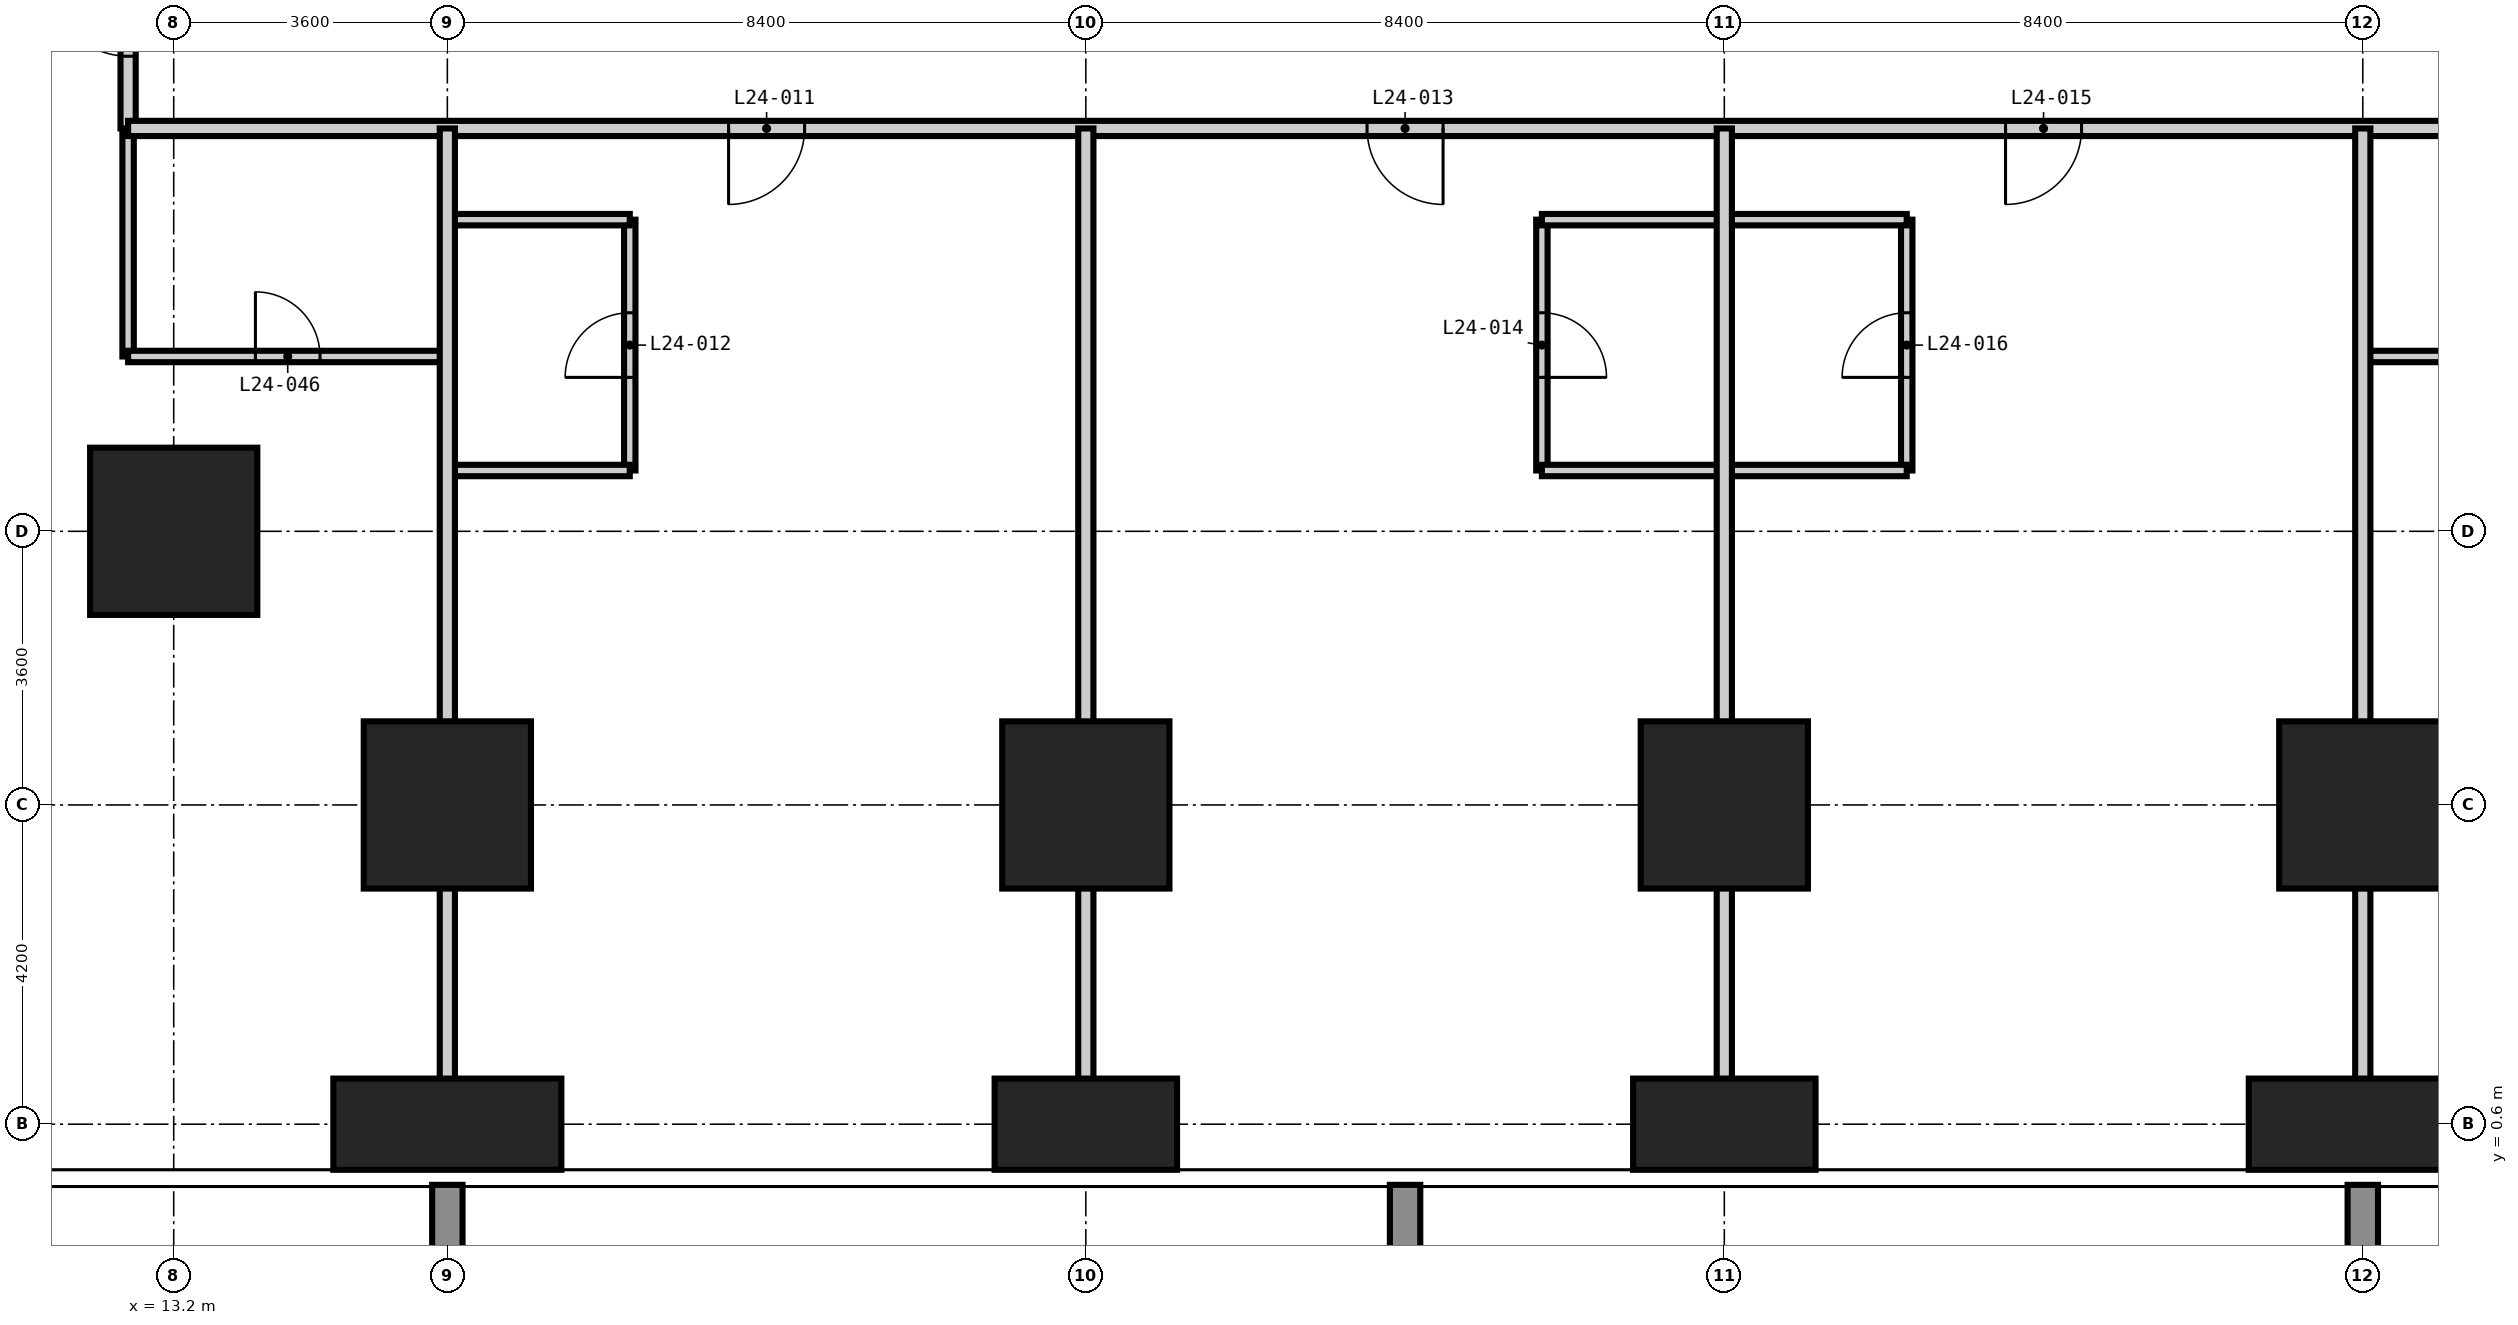
"""IFC4 building model, lengths in metres.
Left out: names, types, materials, properties, quantities, classifications, styles, units other than length and angle.
Written with IfcOpenShell. Run it as: python <this file> out.ifc"""

import sys

from ifc_helpers import new_model, si_unit, direction, frame, frame_2d, origin, origin_2d, place, context, subcontext, project, spatial, rectangle, extrude, element, fill, save


model = new_model("IFC4")
c1 = context("Model", 3, precision=1e-05, world=origin(), true_north=direction((0.0, 1.0)))
c2 = subcontext(c1, "Body", "Model", "MODEL_VIEW")
j1 = project(units=[si_unit("LENGTHUNIT", "METRE"), si_unit("PLANEANGLEUNIT", "RADIAN")], contexts=[c1])
p1 = place(None, origin())
s1 = spatial("IfcSite", under=j1, at=p1, CompositionType="ELEMENT")
p2 = place(p1, origin())
s2 = spatial("IfcBuilding", under=s1, at=p2, CompositionType="ELEMENT")
p3 = place(p2, frame((0.0, 0.0, 97.2)))
s3 = spatial("IfcBuildingStorey", under=s2, at=p3, CompositionType="ELEMENT", Elevation=97.2)
p4 = place(p3, frame((13.2, 8.4, -0.35), z_axis=(0.0, 0.0, 1.0), x_axis=(1.0, 0.0, 0.0)))
e1 = element("IfcColumn", 1, at=p4, inside=s3, PredefinedType="COLUMN", context=c2, shape_type="SweptSolid", body=[
    extrude(rectangle(XDim=2.2, YDim=2.2, at=origin_2d()), origin(), (0.0, 0.0, 1.0), 3.6),
])
p5 = place(p3, frame((16.8, 0.6, -0.35), z_axis=(0.0, 0.0, 1.0), x_axis=(1.0, 0.0, 0.0)))
e2 = element("IfcColumn", 2, at=p5, inside=s3, PredefinedType="COLUMN", context=c2, shape_type="SweptSolid", body=[
    extrude(rectangle(XDim=3.0, YDim=1.2, at=origin_2d()), origin(), (0.0, 0.0, 1.0), 3.6),
])
p6 = place(p3, frame((16.8, 4.8, -0.35), z_axis=(0.0, 0.0, 1.0), x_axis=(1.0, 0.0, 0.0)))
e3 = element("IfcColumn", 3, at=p6, inside=s3, PredefinedType="COLUMN", context=c2, shape_type="SweptSolid", body=[
    extrude(rectangle(XDim=2.2, YDim=2.2, at=origin_2d()), origin(), (0.0, 0.0, 1.0), 3.6),
])
p7 = place(p3, frame((25.2, 0.6, -0.35), z_axis=(0.0, 0.0, 1.0), x_axis=(1.0, 0.0, 0.0)))
e4 = element("IfcColumn", 4, at=p7, inside=s3, PredefinedType="COLUMN", context=c2, shape_type="SweptSolid", body=[
    extrude(rectangle(XDim=2.4, YDim=1.2, at=origin_2d()), origin(), (0.0, 0.0, 1.0), 3.6),
])
p8 = place(p3, frame((25.2, 4.8, -0.35), z_axis=(0.0, 0.0, 1.0), x_axis=(1.0, 0.0, 0.0)))
e5 = element("IfcColumn", 5, at=p8, inside=s3, PredefinedType="COLUMN", context=c2, shape_type="SweptSolid", body=[
    extrude(rectangle(XDim=2.2, YDim=2.2, at=origin_2d()), origin(), (0.0, 0.0, 1.0), 3.6),
])
p9 = place(p3, frame((33.6, 0.6, -0.35), z_axis=(0.0, 0.0, 1.0), x_axis=(1.0, 0.0, 0.0)))
e6 = element("IfcColumn", 6, at=p9, inside=s3, PredefinedType="COLUMN", context=c2, shape_type="SweptSolid", body=[
    extrude(rectangle(XDim=2.4, YDim=1.2, at=origin_2d()), origin(), (0.0, 0.0, 1.0), 3.6),
])
p10 = place(p3, frame((33.6, 4.8, -0.35), z_axis=(0.0, 0.0, 1.0), x_axis=(1.0, 0.0, 0.0)))
e7 = element("IfcColumn", 7, at=p10, inside=s3, PredefinedType="COLUMN", context=c2, shape_type="SweptSolid", body=[
    extrude(rectangle(XDim=2.2, YDim=2.2, at=origin_2d()), origin(), (0.0, 0.0, 1.0), 3.6),
])
p11 = place(p3, frame((42.0, 0.6, -0.35), z_axis=(0.0, 0.0, 1.0), x_axis=(1.0, 0.0, 0.0)))
e8 = element("IfcColumn", 8, at=p11, inside=s3, PredefinedType="COLUMN", context=c2, shape_type="SweptSolid", body=[
    extrude(rectangle(XDim=3.0, YDim=1.2, at=origin_2d()), origin(), (0.0, 0.0, 1.0), 3.6),
])
p12 = place(p3, frame((42.0, 4.8, -0.35), z_axis=(0.0, 0.0, 1.0), x_axis=(1.0, 0.0, 0.0)))
e9 = element("IfcColumn", 9, at=p12, inside=s3, PredefinedType="COLUMN", context=c2, shape_type="SweptSolid", body=[
    extrude(rectangle(XDim=2.2, YDim=2.2, at=origin_2d()), origin(), (0.0, 0.0, 1.0), 3.6),
])
p13 = place(p3, frame((12.6, 10.7, 0.0), z_axis=(0.0, 0.0, 1.0), x_axis=(0.0, 1.0, 0.0)))
e10 = element("IfcWall", 10, at=p13, inside=s3, PredefinedType="PARTITIONING", context=c2, shape_type="SweptSolid", body=[
    extrude(rectangle(XDim=3.0, YDim=0.15, at=frame_2d((1.5, 0.0))), origin(), (0.0, 0.0, 1.0), 3.25),
])
p14 = place(p3, frame((19.2, 9.2, 0.0), z_axis=(0.0, 0.0, 1.0), x_axis=(0.0, 1.0, 0.0)))
e11 = element("IfcWall", 11, at=p14, inside=s3, PredefinedType="PARTITIONING", context=c2, shape_type="SweptSolid", body=[
    extrude(rectangle(XDim=3.3, YDim=0.15, at=frame_2d((1.65, 0.0))), origin(), (0.0, 0.0, 1.0), 3.25),
])
p15 = place(p14, frame((1.225, 0.0, 0.0)))
e12 = element("IfcOpeningElement", 12, at=p15, cuts=e11, PredefinedType="OPENING", context=c2, shape_type="SweptSolid", body=[
    extrude(rectangle(XDim=0.85, YDim=2.1, at=frame_2d((0.425, 1.05))), frame((0.0, 0.085, 0.0), z_axis=(0.0, -1.0, 0.0), x_axis=(1.0, 0.0, 0.0)), (0.0, 0.0, 1.0), 0.17),
])
p16 = place(p3, frame((31.2, 9.2, 0.0), z_axis=(0.0, 0.0, 1.0), x_axis=(0.0, 1.0, 0.0)))
e13 = element("IfcWall", 13, at=p16, inside=s3, PredefinedType="PARTITIONING", context=c2, shape_type="SweptSolid", body=[
    extrude(rectangle(XDim=3.3, YDim=0.15, at=frame_2d((1.65, 0.0))), origin(), (0.0, 0.0, 1.0), 3.25),
])
p17 = place(p16, frame((1.225, 0.0, 0.0)))
e14 = element("IfcOpeningElement", 14, at=p17, cuts=e13, PredefinedType="OPENING", context=c2, shape_type="SweptSolid", body=[
    extrude(rectangle(XDim=0.85, YDim=2.1, at=frame_2d((0.425, 1.05))), frame((0.0, 0.085, 0.0), z_axis=(0.0, -1.0, 0.0), x_axis=(1.0, 0.0, 0.0)), (0.0, 0.0, 1.0), 0.17),
])
p18 = place(p3, frame((36.0, 9.2, 0.0), z_axis=(0.0, 0.0, 1.0), x_axis=(0.0, 1.0, 0.0)))
e15 = element("IfcWall", 15, at=p18, inside=s3, PredefinedType="PARTITIONING", context=c2, shape_type="SweptSolid", body=[
    extrude(rectangle(XDim=3.3, YDim=0.15, at=frame_2d((1.65, 0.0))), origin(), (0.0, 0.0, 1.0), 3.25),
])
p19 = place(p18, frame((1.225, 0.0, 0.0)))
e16 = element("IfcOpeningElement", 16, at=p19, cuts=e15, PredefinedType="OPENING", context=c2, shape_type="SweptSolid", body=[
    extrude(rectangle(XDim=0.85, YDim=2.1, at=frame_2d((0.425, 1.05))), frame((0.0, 0.085, 0.0), z_axis=(0.0, -1.0, 0.0), x_axis=(1.0, 0.0, 0.0)), (0.0, 0.0, 1.0), 0.17),
])
p20 = place(p3, frame((16.8, 9.2, 0.0), z_axis=(0.0, 0.0, 1.0), x_axis=(1.0, 0.0, 0.0)))
e17 = element("IfcWall", 17, at=p20, inside=s3, PredefinedType="PARTITIONING", context=c2, shape_type="SweptSolid", body=[
    extrude(rectangle(XDim=2.4, YDim=0.15, at=frame_2d((1.2, 0.0))), origin(), (0.0, 0.0, 1.0), 3.25),
])
p21 = place(p3, frame((31.2, 9.2, 0.0), z_axis=(0.0, 0.0, 1.0), x_axis=(1.0, 0.0, 0.0)))
e18 = element("IfcWall", 18, at=p21, inside=s3, PredefinedType="PARTITIONING", context=c2, shape_type="SweptSolid", body=[
    extrude(rectangle(XDim=4.8, YDim=0.15, at=frame_2d((2.4, 0.0))), origin(), (0.0, 0.0, 1.0), 3.25),
])
p22 = place(p3, frame((12.6, 10.7, 0.0), z_axis=(0.0, 0.0, 1.0), x_axis=(1.0, 0.0, 0.0)))
e19 = element("IfcWall", 19, at=p22, inside=s3, PredefinedType="PARTITIONING", context=c2, shape_type="SweptSolid", body=[
    extrude(rectangle(XDim=4.2, YDim=0.15, at=frame_2d((2.1, 0.0))), origin(), (0.0, 0.0, 1.0), 3.25),
])
p23 = place(p22, frame((1.675, 0.0, 0.0)))
e20 = element("IfcOpeningElement", 20, at=p23, cuts=e19, PredefinedType="OPENING", context=c2, shape_type="SweptSolid", body=[
    extrude(rectangle(XDim=0.85, YDim=2.1, at=frame_2d((0.425, 1.05))), frame((0.0, 0.085, 0.0), z_axis=(0.0, -1.0, 0.0), x_axis=(1.0, 0.0, 0.0)), (0.0, 0.0, 1.0), 0.17),
])
p24 = place(p3, frame((42.0, 10.7, 0.0), z_axis=(0.0, 0.0, 1.0), x_axis=(1.0, 0.0, 0.0)))
e21 = element("IfcWall", 21, at=p24, inside=s3, PredefinedType="PARTITIONING", context=c2, shape_type="SweptSolid", body=[
    extrude(rectangle(XDim=2.5, YDim=0.15, at=frame_2d((1.25, 0.0))), origin(), (0.0, 0.0, 1.0), 3.25),
])
p25 = place(p3, frame((16.8, 12.5, 0.0), z_axis=(0.0, 0.0, 1.0), x_axis=(1.0, 0.0, 0.0)))
e22 = element("IfcWall", 22, at=p25, inside=s3, PredefinedType="PARTITIONING", context=c2, shape_type="SweptSolid", body=[
    extrude(rectangle(XDim=2.4, YDim=0.15, at=frame_2d((1.2, 0.0))), origin(), (0.0, 0.0, 1.0), 3.25),
])
p26 = place(p3, frame((31.2, 12.5, 0.0), z_axis=(0.0, 0.0, 1.0), x_axis=(1.0, 0.0, 0.0)))
e23 = element("IfcWall", 23, at=p26, inside=s3, PredefinedType="PARTITIONING", context=c2, shape_type="SweptSolid", body=[
    extrude(rectangle(XDim=4.8, YDim=0.15, at=frame_2d((2.4, 0.0))), origin(), (0.0, 0.0, 1.0), 3.25),
])
p27 = place(p3, frame((12.6, 13.7, 0.0), z_axis=(0.0, 0.0, 1.0), x_axis=(0.0, 1.0, 0.0)))
e24 = element("IfcWall", 24, at=p27, inside=s3, PredefinedType="PARTITIONING", context=c2, shape_type="SweptSolid", body=[
    extrude(rectangle(XDim=32.0, YDim=0.2, at=frame_2d((16.0, 0.0))), origin(), (0.0, 0.0, 1.0), 3.25),
])
p28 = place(p27, frame((5.6, 0.0, 0.0)))
e25 = element("IfcOpeningElement", 25, at=p28, cuts=e24, PredefinedType="OPENING", context=c2, shape_type="SweptSolid", body=[
    extrude(rectangle(XDim=1.0, YDim=2.2, at=frame_2d((0.5, 1.1))), frame((0.0, 0.11, 0.0), z_axis=(0.0, -1.0, 0.0), x_axis=(1.0, 0.0, 0.0)), (0.0, 0.0, 1.0), 0.22),
])
p29 = place(p27, frame((16.4, 0.0, 0.0)))
e26 = element("IfcOpeningElement", 26, at=p29, cuts=e24, PredefinedType="OPENING", context=c2, shape_type="SweptSolid", body=[
    extrude(rectangle(XDim=1.0, YDim=2.2, at=frame_2d((0.5, 1.1))), frame((0.0, 0.11, 0.0), z_axis=(0.0, -1.0, 0.0), x_axis=(1.0, 0.0, 0.0)), (0.0, 0.0, 1.0), 0.22),
])
p30 = place(p27, frame((22.4, 0.0, 0.0)))
e27 = element("IfcOpeningElement", 27, at=p30, cuts=e24, PredefinedType="OPENING", context=c2, shape_type="SweptSolid", body=[
    extrude(rectangle(XDim=1.0, YDim=2.2, at=frame_2d((0.5, 1.1))), frame((0.0, 0.11, 0.0), z_axis=(0.0, -1.0, 0.0), x_axis=(1.0, 0.0, 0.0)), (0.0, 0.0, 1.0), 0.22),
])
p31 = place(p27, frame((0.95, 0.0, 0.0)))
e28 = element("IfcOpeningElement", 28, at=p31, cuts=e24, PredefinedType="OPENING", context=c2, shape_type="SweptSolid", body=[
    extrude(rectangle(XDim=1.0, YDim=2.2, at=frame_2d((0.5, 1.1))), frame((0.0, 0.11, 0.0), z_axis=(0.0, -1.0, 0.0), x_axis=(1.0, 0.0, 0.0)), (0.0, 0.0, 1.0), 0.22),
])
p32 = place(p27, frame((29.65, 0.0, 0.0)))
e29 = element("IfcOpeningElement", 29, at=p32, cuts=e24, PredefinedType="OPENING", context=c2, shape_type="SweptSolid", body=[
    extrude(rectangle(XDim=1.0, YDim=2.2, at=frame_2d((0.5, 1.1))), frame((0.0, 0.11, 0.0), z_axis=(0.0, -1.0, 0.0), x_axis=(1.0, 0.0, 0.0)), (0.0, 0.0, 1.0), 0.22),
])
p33 = place(p3, frame((44.5, 13.7, 0.0), z_axis=(0.0, 0.0, 1.0), x_axis=(-1.0, 0.0, 0.0)))
e30 = element("IfcWall", 30, at=p33, inside=s3, PredefinedType="PARTITIONING", context=c2, shape_type="SweptSolid", body=[
    extrude(rectangle(XDim=31.9, YDim=0.2, at=frame_2d((15.95, 0.0))), origin(), (0.0, 0.0, 1.0), 3.25),
])
p34 = place(p33, frame((23.0, 0.0, 0.0)))
e31 = element("IfcOpeningElement", 31, at=p34, cuts=e30, PredefinedType="OPENING", context=c2, shape_type="SweptSolid", body=[
    extrude(rectangle(XDim=1.0, YDim=2.2, at=frame_2d((0.5, 1.1))), frame((0.0, 0.11, 0.0), z_axis=(0.0, -1.0, 0.0), x_axis=(1.0, 0.0, 0.0)), (0.0, 0.0, 1.0), 0.22),
])
p35 = place(p33, frame((14.6, 0.0, 0.0)))
e32 = element("IfcOpeningElement", 32, at=p35, cuts=e30, PredefinedType="OPENING", context=c2, shape_type="SweptSolid", body=[
    extrude(rectangle(XDim=1.0, YDim=2.2, at=frame_2d((0.5, 1.1))), frame((0.0, 0.11, 0.0), z_axis=(0.0, -1.0, 0.0), x_axis=(1.0, 0.0, 0.0)), (0.0, 0.0, 1.0), 0.22),
])
p36 = place(p33, frame((6.2, 0.0, 0.0)))
e33 = element("IfcOpeningElement", 33, at=p36, cuts=e30, PredefinedType="OPENING", context=c2, shape_type="SweptSolid", body=[
    extrude(rectangle(XDim=1.0, YDim=2.2, at=frame_2d((0.5, 1.1))), frame((0.0, 0.11, 0.0), z_axis=(0.0, -1.0, 0.0), x_axis=(1.0, 0.0, 0.0)), (0.0, 0.0, 1.0), 0.22),
])
for number, where, z_axis, x_axis in (
    (34, (16.8, -0.018, 0.0), (0.0, 0.0, 1.0), (0.0, 1.0, 0.0)),
    (35, (25.2, -0.018, 0.0), (0.0, 0.0, 1.0), (0.0, 1.0, 0.0)),
    (36, (33.6, -0.018, 0.0), (0.0, 0.0, 1.0), (0.0, 1.0, 0.0)),
    (37, (42.0, -0.018, 0.0), (0.0, 0.0, 1.0), (0.0, 1.0, 0.0)),
):
    element("IfcWall", number, at=place(p3, frame(where, z_axis=z_axis, x_axis=x_axis)), inside=s3, PredefinedType="PARTITIONING", context=c2, shape_type="SweptSolid", body=[
        extrude(rectangle(XDim=13.718, YDim=0.2, at=frame_2d((6.859, 0.0))), origin(), (0.0, 0.0, 1.0), 3.25),
    ])
p37 = place(p34, origin())
e38 = element("IfcDoor", 38, at=p37, inside=s3, OperationType="SINGLE_SWING_RIGHT", PredefinedType="DOOR", context=c2, shape_type="SweptSolid", body=[
    extrude(rectangle(XDim=1.0, YDim=2.2, at=frame_2d((0.5, 1.1))), frame((0.0, 0.025, 0.0), z_axis=(0.0, -1.0, 0.0), x_axis=(1.0, 0.0, 0.0)), (0.0, 0.0, 1.0), 0.05),
])
fill(e31, e38)
p38 = place(p15, origin())
e39 = element("IfcDoor", 39, at=p38, inside=s3, OperationType="SINGLE_SWING_LEFT", PredefinedType="DOOR", context=c2, shape_type="SweptSolid", body=[
    extrude(rectangle(XDim=0.85, YDim=2.1, at=frame_2d((0.425, 1.05))), frame((0.0, 0.025, 0.0), z_axis=(0.0, -1.0, 0.0), x_axis=(1.0, 0.0, 0.0)), (0.0, 0.0, 1.0), 0.05),
])
fill(e12, e39)
p39 = place(p35, origin())
e40 = element("IfcDoor", 40, at=p39, inside=s3, OperationType="SINGLE_SWING_LEFT", PredefinedType="DOOR", context=c2, shape_type="SweptSolid", body=[
    extrude(rectangle(XDim=1.0, YDim=2.2, at=frame_2d((0.5, 1.1))), frame((0.0, 0.025, 0.0), z_axis=(0.0, -1.0, 0.0), x_axis=(1.0, 0.0, 0.0)), (0.0, 0.0, 1.0), 0.05),
])
fill(e32, e40)
p40 = place(p17, frame((0.85, 0.0, 0.0), z_axis=(0.0, 0.0, 1.0), x_axis=(-1.0, 0.0, 0.0)))
e41 = element("IfcDoor", 41, at=p40, inside=s3, OperationType="SINGLE_SWING_RIGHT", PredefinedType="DOOR", context=c2, shape_type="SweptSolid", body=[
    extrude(rectangle(XDim=0.85, YDim=2.1, at=frame_2d((0.425, 1.05))), frame((0.0, 0.025, 0.0), z_axis=(0.0, -1.0, 0.0), x_axis=(1.0, 0.0, 0.0)), (0.0, 0.0, 1.0), 0.05),
])
fill(e14, e41)
p41 = place(p36, origin())
e42 = element("IfcDoor", 42, at=p41, inside=s3, OperationType="SINGLE_SWING_RIGHT", PredefinedType="DOOR", context=c2, shape_type="SweptSolid", body=[
    extrude(rectangle(XDim=1.0, YDim=2.2, at=frame_2d((0.5, 1.1))), frame((0.0, 0.025, 0.0), z_axis=(0.0, -1.0, 0.0), x_axis=(1.0, 0.0, 0.0)), (0.0, 0.0, 1.0), 0.05),
])
fill(e33, e42)
p42 = place(p19, origin())
e43 = element("IfcDoor", 43, at=p42, inside=s3, OperationType="SINGLE_SWING_LEFT", PredefinedType="DOOR", context=c2, shape_type="SweptSolid", body=[
    extrude(rectangle(XDim=0.85, YDim=2.1, at=frame_2d((0.425, 1.05))), frame((0.0, 0.025, 0.0), z_axis=(0.0, -1.0, 0.0), x_axis=(1.0, 0.0, 0.0)), (0.0, 0.0, 1.0), 0.05),
])
fill(e16, e43)
p43 = place(p31, origin())
e44 = element("IfcDoor", 44, at=p43, inside=s3, OperationType="SINGLE_SWING_RIGHT", PredefinedType="DOOR", context=c2, shape_type="SweptSolid", body=[
    extrude(rectangle(XDim=1.0, YDim=2.2, at=frame_2d((0.5, 1.1))), frame((0.0, 0.025, 0.0), z_axis=(0.0, -1.0, 0.0), x_axis=(1.0, 0.0, 0.0)), (0.0, 0.0, 1.0), 0.05),
])
fill(e28, e44)
p44 = place(p23, origin())
e45 = element("IfcDoor", 45, at=p44, inside=s3, OperationType="SINGLE_SWING_LEFT", PredefinedType="DOOR", context=c2, shape_type="SweptSolid", body=[
    extrude(rectangle(XDim=0.85, YDim=2.1, at=frame_2d((0.425, 1.05))), frame((0.0, 0.025, 0.0), z_axis=(0.0, -1.0, 0.0), x_axis=(1.0, 0.0, 0.0)), (0.0, 0.0, 1.0), 0.05),
])
fill(e20, e45)
save(model, sys.argv[1])
